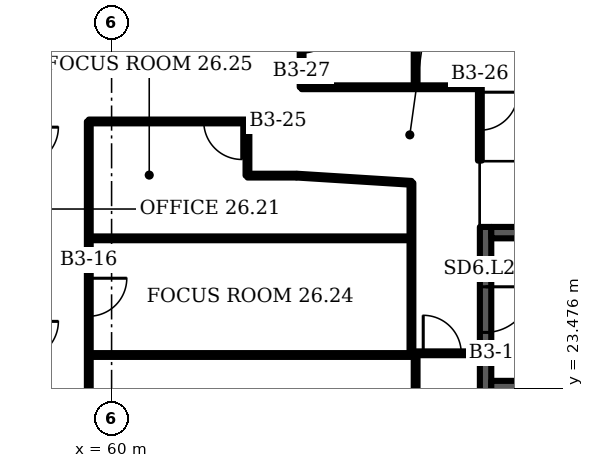
"""IFC4 building model, lengths in metres.
Left out: names, types, materials, properties, quantities, classifications, styles, units other than length and angle.
Written with IfcOpenShell. Run it as: python <this file> out.ifc"""

import sys

from ifc_helpers import new_model, si_unit, direction, frame, frame_2d, origin, place, context, subcontext, project, spatial, rectangle, extrude, element, fill, save


model = new_model("IFC4")
c1 = context("Model", 3, precision=1e-05, world=origin(), true_north=direction((0.0, 1.0)))
c2 = subcontext(c1, "Body", "Model", "MODEL_VIEW")
j1 = project(units=[si_unit("LENGTHUNIT", "METRE"), si_unit("PLANEANGLEUNIT", "RADIAN")], contexts=[c1])
p1 = place(None, origin())
s1 = spatial("IfcSite", under=j1, at=p1, CompositionType="ELEMENT")
p2 = place(p1, origin())
s2 = spatial("IfcBuilding", under=s1, at=p2, CompositionType="ELEMENT")
p3 = place(p2, frame((0.0, 0.0, 114.7)))
s3 = spatial("IfcBuildingStorey", under=s2, at=p3, CompositionType="ELEMENT", Elevation=114.7)
p4 = place(p3, frame((69.84, 23.375, 0.0), z_axis=(0.0, 0.0, 1.0), x_axis=(0.0, 1.0, 0.0)))
e1 = element("IfcWall", 1, at=p4, inside=s3, PredefinedType="SHEAR", context=c2, shape_type="SweptSolid", body=[
    extrude(rectangle(XDim=4.35, YDim=0.3, at=frame_2d((2.175, 0.0))), origin(), (0.0, 0.0, 1.0), 3.2),
])
p5 = place(p4, frame((1.575, 0.0, 0.0)))
e2 = element("IfcOpeningElement", 2, at=p5, cuts=e1, PredefinedType="OPENING", context=c2, shape_type="SweptSolid", body=[
    extrude(rectangle(XDim=1.2, YDim=2.1, at=frame_2d((0.6, 1.05))), frame((0.0, 0.16, 0.0), z_axis=(0.0, -1.0, 0.0), x_axis=(1.0, 0.0, 0.0)), (0.0, 0.0, 1.0), 0.32),
])
p6 = place(p3, frame((59.4, 13.7, 0.0), z_axis=(0.0, 0.0, 1.0), x_axis=(0.0, 1.0, 0.0)))
e3 = element("IfcWall", 3, at=p6, inside=s3, PredefinedType="PARTITIONING", context=c2, shape_type="SweptSolid", body=[
    extrude(rectangle(XDim=16.8, YDim=0.1, at=frame_2d((8.4, 0.0))), origin(), (0.0, 0.0, 1.0), 3.2),
])
p7 = place(p6, frame((2.45, 0.0, 0.0)))
e4 = element("IfcOpeningElement", 4, at=p7, cuts=e3, PredefinedType="OPENING", context=c2, shape_type="SweptSolid", body=[
    extrude(rectangle(XDim=1.0, YDim=2.1, at=frame_2d((0.5, 1.05))), frame((0.0, 0.06, 0.0), z_axis=(0.0, -1.0, 0.0), x_axis=(1.0, 0.0, 0.0)), (0.0, 0.0, 1.0), 0.12),
])
p8 = place(p6, frame((7.125, 0.0, 0.0)))
e5 = element("IfcOpeningElement", 5, at=p8, cuts=e3, PredefinedType="OPENING", context=c2, shape_type="SweptSolid", body=[
    extrude(rectangle(XDim=1.0, YDim=2.1, at=frame_2d((0.5, 1.05))), frame((0.0, 0.06, 0.0), z_axis=(0.0, -1.0, 0.0), x_axis=(1.0, 0.0, 0.0)), (0.0, 0.0, 1.0), 0.12),
])
p9 = place(p6, frame((11.675, 0.0, 0.0)))
e6 = element("IfcOpeningElement", 6, at=p9, cuts=e3, PredefinedType="OPENING", context=c2, shape_type="SweptSolid", body=[
    extrude(rectangle(XDim=1.0, YDim=2.1, at=frame_2d((0.5, 1.05))), frame((0.0, 0.06, 0.0), z_axis=(0.0, -1.0, 0.0), x_axis=(1.0, 0.0, 0.0)), (0.0, 0.0, 1.0), 0.12),
])
p10 = place(p3, frame((59.4, 24.355, 0.0), z_axis=(0.0, 0.0, 1.0), x_axis=(1.0, 0.0, 0.0)))
e7 = element("IfcWall", 7, at=p10, inside=s3, PredefinedType="PARTITIONING", context=c2, shape_type="SweptSolid", body=[
    extrude(rectangle(XDim=8.6, YDim=0.1, at=frame_2d((4.3, 0.0))), origin(), (0.0, 0.0, 1.0), 3.2),
])
p11 = place(p3, frame((59.4, 27.425, 0.0), z_axis=(0.0, 0.0, 1.0), x_axis=(1.0, 0.0, 0.0)))
e8 = element("IfcWall", 8, at=p11, inside=s3, PredefinedType="PARTITIONING", context=c2, shape_type="SweptSolid", body=[
    extrude(rectangle(XDim=8.49, YDim=0.1, at=frame_2d((4.245, 0.0))), origin(), (0.0, 0.0, 1.0), 3.2),
])
p12 = place(p3, frame((59.4, 30.5, 0.0), z_axis=(0.0, 0.0, 1.0), x_axis=(1.0, 0.0, 0.0)))
e9 = element("IfcWall", 9, at=p12, inside=s3, PredefinedType="PARTITIONING", context=c2, shape_type="SweptSolid", body=[
    extrude(rectangle(XDim=4.175, YDim=0.1, at=frame_2d((2.087, 0.0))), origin(), (0.0, 0.0, 1.0), 3.2),
])
p13 = place(p12, frame((3.025, 0.0, 0.0)))
e10 = element("IfcOpeningElement", 10, at=p13, cuts=e9, PredefinedType="OPENING", context=c2, shape_type="SweptSolid", body=[
    extrude(rectangle(XDim=1.0, YDim=2.1, at=frame_2d((0.5, 1.05))), frame((0.0, 0.06, 0.0), z_axis=(0.0, -1.0, 0.0), x_axis=(1.0, 0.0, 0.0)), (0.0, 0.0, 1.0), 0.12),
])
p14 = place(p3, frame((63.575, 29.075, 0.0), z_axis=(0.0, 0.0, 1.0), x_axis=(0.0, 1.0, 0.0)))
e11 = element("IfcWall", 11, at=p14, inside=s3, PredefinedType="PARTITIONING", context=c2, shape_type="SweptSolid", body=[
    extrude(rectangle(XDim=1.425, YDim=0.1, at=frame_2d((0.712, 0.0))), origin(), (0.0, 0.0, 1.0), 3.2),
])
p15 = place(p3, frame((63.575, 29.075, 0.0), z_axis=(0.0, 0.0, 1.0), x_axis=(1.0, 0.0, 0.0)))
e12 = element("IfcWall", 12, at=p15, inside=s3, PredefinedType="PARTITIONING", context=c2, shape_type="SweptSolid", body=[
    extrude(rectangle(XDim=1.285, YDim=0.1, at=frame_2d((0.643, 0.0))), origin(), (0.0, 0.0, 1.0), 3.2),
])
p16 = place(p3, frame((65.0, 31.4, 0.0), z_axis=(0.0, 0.0, 1.0), x_axis=(0.0, 1.0, 0.0)))
e13 = element("IfcWall", 13, at=p16, inside=s3, PredefinedType="PARTITIONING", context=c2, shape_type="SweptSolid", body=[
    extrude(rectangle(XDim=2.58, YDim=0.1, at=frame_2d((1.29, 0.0))), origin(), (0.0, 0.0, 1.0), 3.2),
])
p17 = place(p16, frame((0.9, 0.0, 0.0)))
e14 = element("IfcOpeningElement", 14, at=p17, cuts=e13, PredefinedType="OPENING", context=c2, shape_type="SweptSolid", body=[
    extrude(rectangle(XDim=1.0, YDim=2.1, at=frame_2d((0.5, 1.05))), frame((0.0, 0.06, 0.0), z_axis=(0.0, -1.0, 0.0), x_axis=(1.0, 0.0, 0.0)), (0.0, 0.0, 1.0), 0.12),
])
p18 = place(p3, frame((65.0, 31.4, 0.0), z_axis=(0.0, 0.0, 1.0), x_axis=(1.0, 0.0, 0.0)))
e15 = element("IfcWall", 15, at=p18, inside=s3, PredefinedType="PARTITIONING", context=c2, shape_type="SweptSolid", body=[
    extrude(rectangle(XDim=4.69, YDim=0.1, at=frame_2d((2.345, 0.0))), origin(), (0.0, 0.0, 1.0), 3.2),
])
p19 = place(p3, frame((67.89, 24.4, 0.0), z_axis=(0.0, 0.0, 1.0), x_axis=(0.0, 1.0, 0.0)))
e16 = element("IfcWall", 16, at=p19, inside=s3, PredefinedType="PARTITIONING", context=c2, shape_type="SweptSolid", body=[
    extrude(rectangle(XDim=4.485, YDim=0.1, at=frame_2d((2.243, 0.0))), origin(), (0.0, 0.0, 1.0), 3.2),
])
p20 = place(p3, frame((68.0, 24.4, 0.0), z_axis=(0.0, 0.0, 1.0), x_axis=(1.0, 0.0, 0.0)))
e17 = element("IfcWall", 17, at=p20, inside=s3, PredefinedType="PARTITIONING", context=c2, shape_type="SweptSolid", body=[
    extrude(rectangle(XDim=1.67, YDim=0.1, at=frame_2d((0.835, 0.0))), origin(), (0.0, 0.0, 1.0), 3.2),
])
p21 = place(p20, frame((0.2, 0.0, 0.0)))
e18 = element("IfcOpeningElement", 18, at=p21, cuts=e17, PredefinedType="OPENING", context=c2, shape_type="SweptSolid", body=[
    extrude(rectangle(XDim=1.0, YDim=2.1, at=frame_2d((0.5, 1.05))), frame((0.0, 0.06, 0.0), z_axis=(0.0, -1.0, 0.0), x_axis=(1.0, 0.0, 0.0)), (0.0, 0.0, 1.0), 0.12),
])
p22 = place(p3, frame((67.89, 28.885, 0.0), z_axis=(0.0, 0.0, 1.0), x_axis=(-0.998031, 0.062786, 0.0)))
e19 = element("IfcWall", 19, at=p22, inside=s3, PredefinedType="PARTITIONING", context=c2, shape_type="SweptSolid", body=[
    extrude(rectangle(XDim=3.021, YDim=0.1, at=frame_2d((1.511, 0.0))), origin(), (0.0, 0.0, 1.0), 3.2),
])
p23 = place(p3, frame((68.0, 15.13, 0.0), z_axis=(0.0, 0.0, 1.0), x_axis=(0.0, 1.0, 0.0)))
e20 = element("IfcWall", 20, at=p23, inside=s3, PredefinedType="PARTITIONING", context=c2, shape_type="SweptSolid", body=[
    extrude(rectangle(XDim=9.22, YDim=0.1, at=frame_2d((4.61, 0.0))), origin(), (0.0, 0.0, 1.0), 3.2),
])
p24 = place(p3, frame((68.0, 31.4, 0.0), z_axis=(0.0, 0.0, 1.0), x_axis=(0.0, 1.0, 0.0)))
e21 = element("IfcWall", 21, at=p24, inside=s3, PredefinedType="PARTITIONING", context=c2, shape_type="SweptSolid", body=[
    extrude(rectangle(XDim=8.79, YDim=0.1, at=frame_2d((4.395, 0.0))), origin(), (0.0, 0.0, 1.0), 3.2),
])
p25 = place(p3, frame((69.69, 29.47, 0.0), z_axis=(0.0, 0.0, 1.0), x_axis=(0.0, 1.0, 0.0)))
e22 = element("IfcWall", 22, at=p25, inside=s3, PredefinedType="PARTITIONING", context=c2, shape_type="SweptSolid", body=[
    extrude(rectangle(XDim=1.93, YDim=0.1, at=frame_2d((0.965, 0.0))), origin(), (0.0, 0.0, 1.0), 3.2),
])
p26 = place(p25, frame((0.8, 0.0, 0.0)))
e23 = element("IfcOpeningElement", 23, at=p26, cuts=e22, PredefinedType="OPENING", context=c2, shape_type="SweptSolid", body=[
    extrude(rectangle(XDim=1.0, YDim=2.1, at=frame_2d((0.5, 1.05))), frame((0.0, 0.06, 0.0), z_axis=(0.0, -1.0, 0.0), x_axis=(1.0, 0.0, 0.0)), (0.0, 0.0, 1.0), 0.12),
])
for number, where, z_axis, x_axis in (
    (24, (69.99, 23.525, 0.0), (0.0, 0.0, 1.0), (1.0, 0.0, 0.0)),
    (25, (69.99, 27.575, 0.0), (0.0, 0.0, 1.0), (1.0, 0.0, 0.0)),
):
    element("IfcWall", number, at=place(p3, frame(where, z_axis=z_axis, x_axis=x_axis)), inside=s3, PredefinedType="SHEAR", context=c2, shape_type="SweptSolid", body=[
        extrude(rectangle(XDim=7.5, YDim=0.3, at=frame_2d((3.75, 0.0))), origin(), (0.0, 0.0, 1.0), 3.2),
    ])
p27 = place(p5, origin())
e26 = element("IfcDoor", 26, at=p27, inside=s3, OperationType="SINGLE_SWING_RIGHT", PredefinedType="DOOR", context=c2, shape_type="SweptSolid", body=[
    extrude(rectangle(XDim=1.2, YDim=2.1, at=frame_2d((0.6, 1.05))), frame((0.0, 0.025, 0.0), z_axis=(0.0, -1.0, 0.0), x_axis=(1.0, 0.0, 0.0)), (0.0, 0.0, 1.0), 0.05),
])
fill(e2, e26)
p28 = place(p21, origin())
e27 = element("IfcDoor", 27, at=p28, inside=s3, OperationType="SINGLE_SWING_LEFT", PredefinedType="DOOR", context=c2, shape_type="SweptSolid", body=[
    extrude(rectangle(XDim=1.0, YDim=2.1, at=frame_2d((0.5, 1.05))), frame((0.0, 0.025, 0.0), z_axis=(0.0, -1.0, 0.0), x_axis=(1.0, 0.0, 0.0)), (0.0, 0.0, 1.0), 0.05),
])
fill(e18, e27)
p29 = place(p9, origin())
e28 = element("IfcDoor", 28, at=p29, inside=s3, OperationType="SINGLE_SWING_RIGHT", PredefinedType="DOOR", context=c2, shape_type="SweptSolid", body=[
    extrude(rectangle(XDim=1.0, YDim=2.1, at=frame_2d((0.5, 1.05))), frame((0.0, 0.025, 0.0), z_axis=(0.0, -1.0, 0.0), x_axis=(1.0, 0.0, 0.0)), (0.0, 0.0, 1.0), 0.05),
])
fill(e6, e28)
p30 = place(p13, origin())
e29 = element("IfcDoor", 29, at=p30, inside=s3, OperationType="SINGLE_SWING_RIGHT", PredefinedType="DOOR", context=c2, shape_type="SweptSolid", body=[
    extrude(rectangle(XDim=1.0, YDim=2.1, at=frame_2d((0.5, 1.05))), frame((0.0, 0.025, 0.0), z_axis=(0.0, -1.0, 0.0), x_axis=(1.0, 0.0, 0.0)), (0.0, 0.0, 1.0), 0.05),
])
fill(e10, e29)
p31 = place(p26, origin())
e30 = element("IfcDoor", 30, at=p31, inside=s3, OperationType="SINGLE_SWING_RIGHT", PredefinedType="DOOR", context=c2, shape_type="SweptSolid", body=[
    extrude(rectangle(XDim=1.0, YDim=2.1, at=frame_2d((0.5, 1.05))), frame((0.0, 0.025, 0.0), z_axis=(0.0, -1.0, 0.0), x_axis=(1.0, 0.0, 0.0)), (0.0, 0.0, 1.0), 0.05),
])
fill(e23, e30)
p32 = place(p17, origin())
e31 = element("IfcDoor", 31, at=p32, inside=s3, OperationType="SINGLE_SWING_RIGHT", PredefinedType="DOOR", context=c2, shape_type="SweptSolid", body=[
    extrude(rectangle(XDim=1.0, YDim=2.1, at=frame_2d((0.5, 1.05))), frame((0.0, 0.025, 0.0), z_axis=(0.0, -1.0, 0.0), x_axis=(1.0, 0.0, 0.0)), (0.0, 0.0, 1.0), 0.05),
])
fill(e14, e31)
save(model, sys.argv[1])
